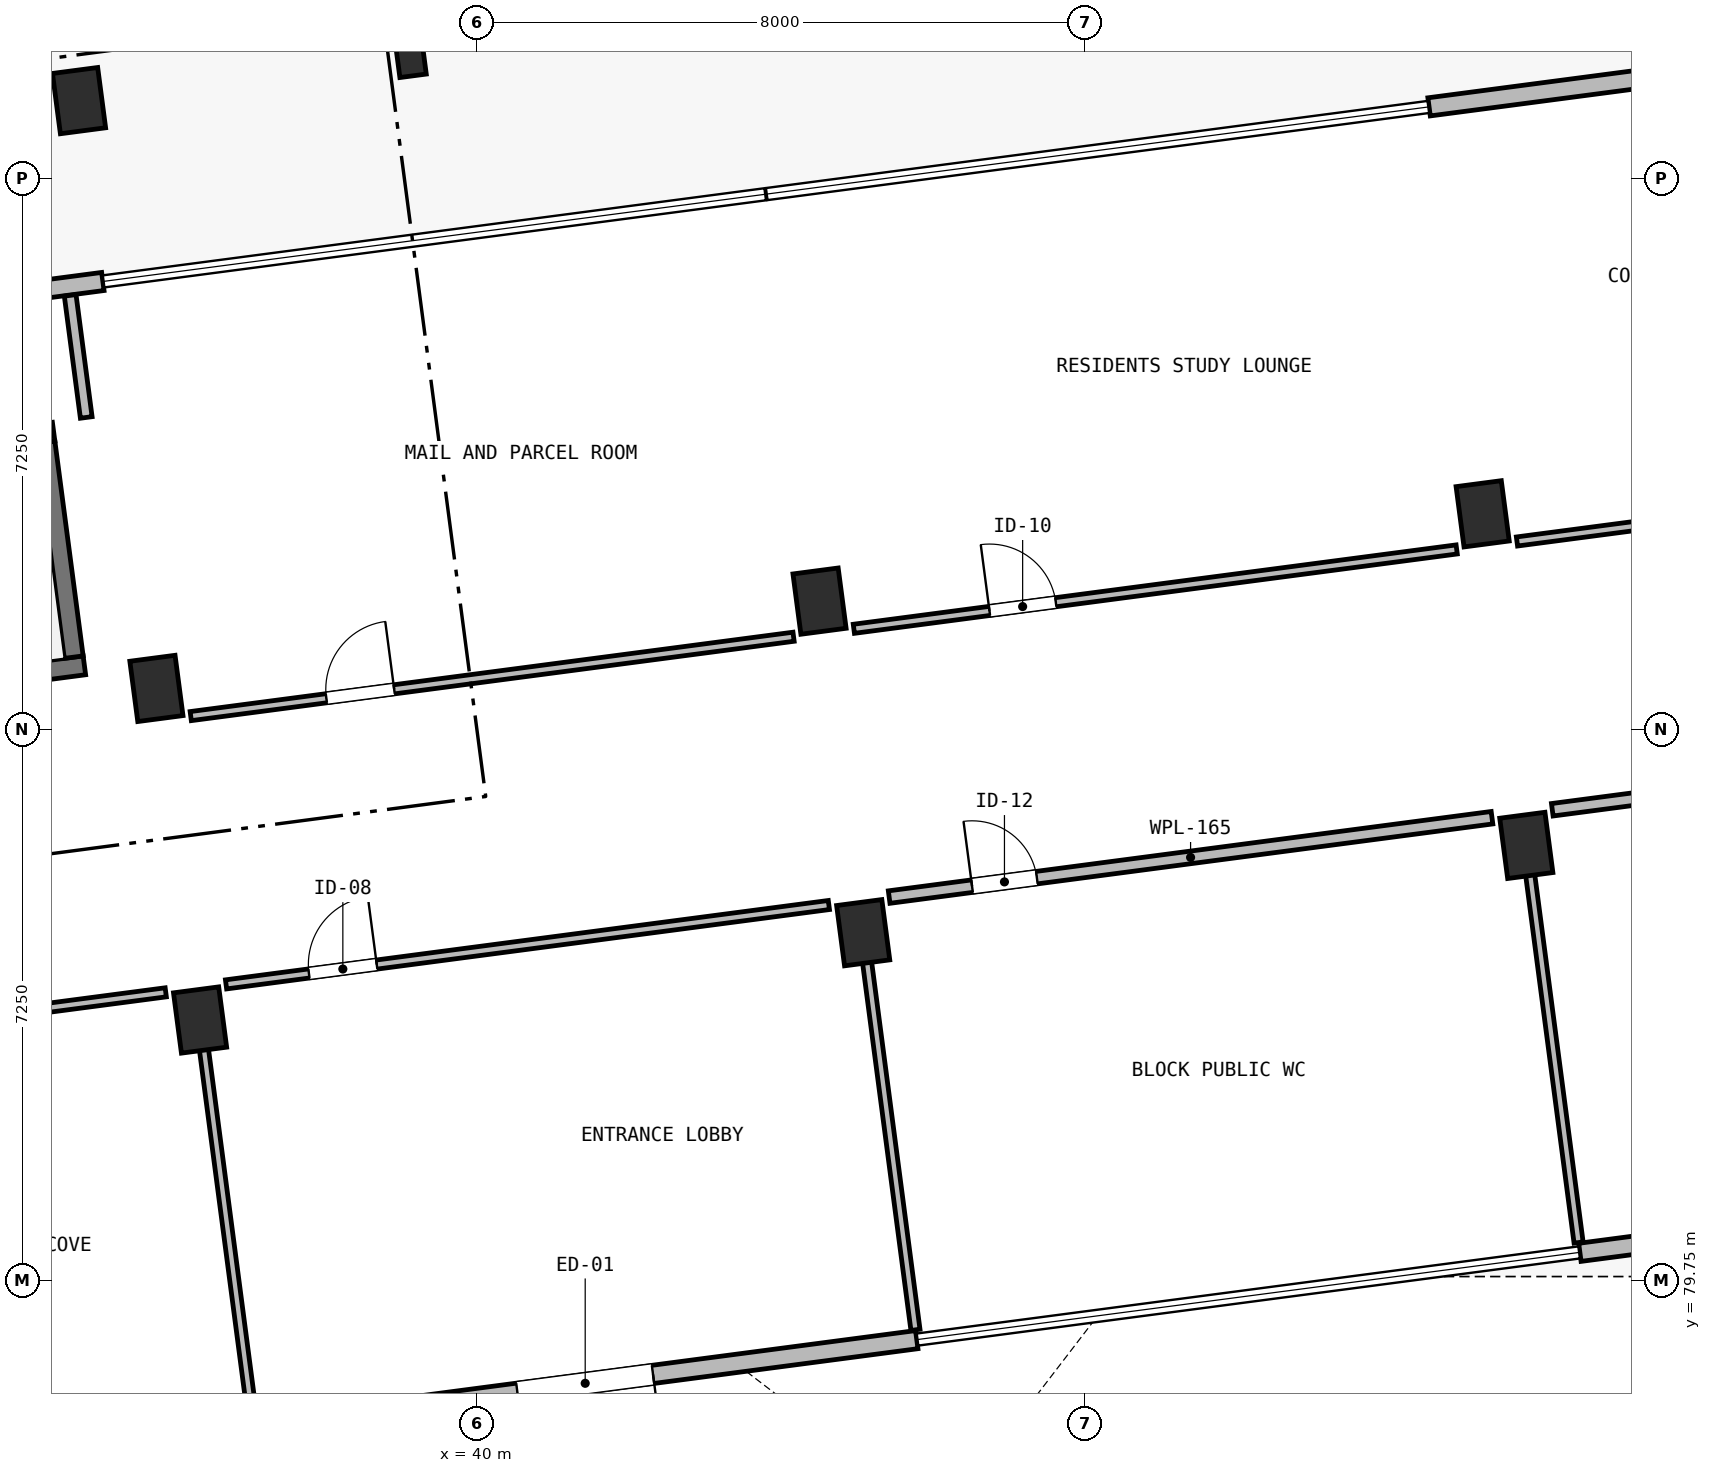
"""IFC4 building model, lengths in metres.
Left out: names, types, materials, properties, quantities, classifications, styles, units other than length and angle.
Written with IfcOpenShell. Run it as: python <this file> out.ifc"""

import sys

from ifc_helpers import new_model, si_unit, direction, frame, frame_2d, origin, origin_2d, place, context, subcontext, project, spatial, rectangle, extrude, element, fill, save


model = new_model("IFC4")
c1 = context("Model", 3, precision=1e-05, world=origin(), true_north=direction((0.0, 1.0)))
c2 = subcontext(c1, "Body", "Model", "MODEL_VIEW")
j1 = project(units=[si_unit("LENGTHUNIT", "METRE"), si_unit("PLANEANGLEUNIT", "RADIAN")], contexts=[c1])
p1 = place(None, origin())
s1 = spatial("IfcSite", under=j1, at=p1, CompositionType="ELEMENT")
p2 = place(p1, origin())
s2 = spatial("IfcBuilding", under=s1, at=p2, CompositionType="ELEMENT")
p3 = place(p2, origin())
s3 = spatial("IfcBuildingStorey", under=s2, at=p3, CompositionType="ELEMENT", Elevation=0.0)
for number, where, z_axis, x_axis in (
    (1, (36.356, 83.179, -0.35), (0.0, 0.0, 1.0), (0.991, 0.131, 0.0)),
    (2, (35.782, 87.542, -0.35), (0.0, 0.0, 1.0), (0.991, 0.131, 0.0)),
    (3, (34.764, 95.275, -0.35), (0.0, 0.0, 1.0), (0.991, 0.131, 0.0)),
    (4, (45.081, 84.328, -0.35), (0.0, 0.0, 1.0), (0.991, 0.131, 0.0)),
    (5, (44.506, 88.69, -0.35), (0.0, 0.0, 1.0), (0.991, 0.131, 0.0)),
    (6, (53.805, 85.476, -0.35), (0.0, 0.0, 1.0), (0.991, 0.131, 0.0)),
    (7, (53.231, 89.839, -0.35), (0.0, 0.0, 1.0), (0.991, 0.131, 0.0)),
):
    element("IfcColumn", number, at=place(p3, frame(where, z_axis=z_axis, x_axis=x_axis)), inside=s3, PredefinedType="COLUMN", context=c2, shape_type="SweptSolid", body=[
        extrude(rectangle(XDim=0.6, YDim=0.8, at=origin_2d()), origin(), (0.0, 0.0, 1.0), 4.85),
    ])
p4 = place(p3, frame((39.126, 95.849, -0.35), z_axis=(0.0, 0.0, 1.0), x_axis=(0.991444861374, 0.13052619222, 0.0)))
e8 = element("IfcColumn", 8, at=p4, inside=s3, PredefinedType="PILASTER", context=c2, shape_type="SweptSolid", body=[
    extrude(rectangle(XDim=0.35, YDim=0.5, at=origin_2d()), origin(), (0.0, 0.0, 1.0), 3.7),
])
p5 = place(p3, frame((27.489, 90.005, -0.35), z_axis=(0.0, 0.0, 1.0), x_axis=(0.991441944909, 0.130548343059, 0.0)))
e9 = element("IfcWall", 9, at=p5, inside=s3, PredefinedType="SHEAR", context=c2, shape_type="SweptSolid", body=[
    extrude(rectangle(XDim=7.0, YDim=0.25, at=frame_2d((3.5, 0.0))), origin(), (0.0, 0.0, 1.0), 4.85),
])
p6 = place(p5, frame((0.45, 0.0, 0.35)))
e10 = element("IfcOpeningElement", 10, at=p6, cuts=e9, PredefinedType="OPENING", context=c2, shape_type="SweptSolid", body=[
    extrude(rectangle(XDim=1.12, YDim=2.15, at=frame_2d((0.56, 1.075))), frame((0.0, 0.14, 0.0), z_axis=(0.0, -1.0, 0.0), x_axis=(1.0, 0.0, 0.0)), (0.0, 0.0, 1.0), 0.28),
])
p7 = place(p3, frame((27.894, 86.932, -0.35), z_axis=(0.0, 0.0, 1.0), x_axis=(0.991442539299, 0.130543828916, 0.0)))
e11 = element("IfcWall", 11, at=p7, inside=s3, PredefinedType="SHEAR", context=c2, shape_type="SweptSolid", body=[
    extrude(rectangle(XDim=7.0, YDim=0.25, at=frame_2d((3.5, 0.0))), origin(), (0.0, 0.0, 1.0), 4.85),
])
p8 = place(p7, frame((0.45, 0.0, 0.35)))
e12 = element("IfcOpeningElement", 12, at=p8, cuts=e11, PredefinedType="OPENING", context=c2, shape_type="SweptSolid", body=[
    extrude(rectangle(XDim=1.05, YDim=2.15, at=frame_2d((0.525, 1.075))), frame((0.0, 0.14, 0.0), z_axis=(0.0, -1.0, 0.0), x_axis=(1.0, 0.0, 0.0)), (0.0, 0.0, 1.0), 0.28),
])
p9 = place(p3, frame((34.694, 87.953, -0.35), z_axis=(0.0, 0.0, 1.0), x_axis=(-0.130474457355, 0.991451671025, 0.0)))
e13 = element("IfcWall", 13, at=p9, inside=s3, PredefinedType="SHEAR", context=c2, shape_type="SweptSolid", body=[
    extrude(rectangle(XDim=2.85, YDim=0.25, at=frame_2d((1.425, 0.0))), origin(), (0.0, 0.0, 1.0), 4.85),
])
p10 = place(p3, frame((45.786, 78.974, 0.0), z_axis=(0.0, 0.0, 1.0), x_axis=(-0.991447967712, -0.130502595073, 0.0)))
e14 = element("IfcWall", 14, at=p10, inside=s3, PredefinedType="SOLIDWALL", context=c2, shape_type="SweptSolid", body=[
    extrude(rectangle(XDim=8.8, YDim=0.24, at=frame_2d((4.4, 0.0))), origin(), (0.0, 0.0, 1.0), 3.35),
])
p11 = place(p10, frame((3.5, 0.0, 0.0)))
e15 = element("IfcOpeningElement", 15, at=p11, cuts=e14, PredefinedType="OPENING", context=c2, shape_type="SweptSolid", body=[
    extrude(rectangle(XDim=1.8, YDim=2.4, at=frame_2d((0.9, 1.2))), frame((0.0, 0.135, 0.0), z_axis=(0.0, -1.0, 0.0), x_axis=(1.0, 0.0, 0.0)), (0.0, 0.0, 1.0), 0.27),
])
p12 = place(p3, frame((63.235, 81.271, 0.0), z_axis=(0.0, 0.0, 1.0), x_axis=(-0.991444377792, -0.130529865336, 0.0)))
e16 = element("IfcWall", 16, at=p12, inside=s3, PredefinedType="SOLIDWALL", context=c2, shape_type="SweptSolid", body=[
    extrude(rectangle(XDim=8.8, YDim=0.24, at=frame_2d((4.4, 0.0))), origin(), (0.0, 0.0, 1.0), 3.35),
])
p13 = place(p12, frame((4.01, 0.0, 0.55)))
e17 = element("IfcOpeningElement", 17, at=p13, cuts=e16, PredefinedType="OPENING", context=c2, shape_type="SweptSolid", body=[
    extrude(rectangle(XDim=0.78, YDim=2.2, at=frame_2d((0.39, 1.1))), frame((0.0, 0.135, 0.0), z_axis=(0.0, -1.0, 0.0), x_axis=(1.0, 0.0, 0.0)), (0.0, 0.0, 1.0), 0.27),
])
p14 = place(p3, frame((26.352, 91.747, 0.0), z_axis=(0.0, 0.0, 1.0), x_axis=(0.991444377792, 0.130529865336, 0.0)))
e18 = element("IfcWall", 18, at=p14, inside=s3, PredefinedType="SOLIDWALL", context=c2, shape_type="SweptSolid", body=[
    extrude(rectangle(XDim=8.8, YDim=0.24, at=frame_2d((4.4, 0.0))), origin(), (0.0, 0.0, 1.0), 3.35),
])
p15 = place(p14, frame((3.85, 0.0, 0.0)))
e19 = element("IfcOpeningElement", 19, at=p15, cuts=e18, PredefinedType="OPENING", context=c2, shape_type="SweptSolid", body=[
    extrude(rectangle(XDim=1.1, YDim=2.15, at=frame_2d((0.55, 1.075))), frame((0.0, 0.135, 0.0), z_axis=(0.0, -1.0, 0.0), x_axis=(1.0, 0.0, 0.0)), (0.0, 0.0, 1.0), 0.27),
])
p16 = place(p3, frame((52.526, 95.193, 0.0), z_axis=(0.0, 0.0, 1.0), x_axis=(0.991443905089, 0.130533455715, 0.0)))
e20 = element("IfcWall", 20, at=p16, inside=s3, PredefinedType="SOLIDWALL", context=c2, shape_type="SweptSolid", body=[
    extrude(rectangle(XDim=8.8, YDim=0.24, at=frame_2d((4.4, 0.0))), origin(), (0.0, 0.0, 1.0), 3.35),
])
p17 = place(p3, frame((30.848, 82.878, 0.0), z_axis=(0.0, 0.0, 1.0), x_axis=(0.991441907417, 0.13054862779, 0.0)))
e21 = element("IfcWall", 21, at=p17, inside=s3, PredefinedType="PARTITIONING", context=c2, shape_type="SweptSolid", body=[
    extrude(rectangle(XDim=5.1, YDim=0.12, at=frame_2d((2.55, 0.0))), origin(), (0.0, 0.0, 1.0), 4.22),
])
p18 = place(p17, frame((1.1, 0.0, 0.0)))
e22 = element("IfcOpeningElement", 22, at=p18, cuts=e21, PredefinedType="OPENING", context=c2, shape_type="SweptSolid", body=[
    extrude(rectangle(XDim=0.88, YDim=2.1, at=frame_2d((0.44, 1.05))), frame((0.0, 0.075, 0.0), z_axis=(0.0, -1.0, 0.0), x_axis=(1.0, 0.0, 0.0)), (0.0, 0.0, 1.0), 0.15),
])
p19 = place(p3, frame((36.698, 83.648, 0.0), z_axis=(0.0, 0.0, 1.0), x_axis=(0.991445360318, 0.130522402305, 0.0)))
e23 = element("IfcWall", 23, at=p19, inside=s3, PredefinedType="PARTITIONING", context=c2, shape_type="SweptSolid", body=[
    extrude(rectangle(XDim=8.0, YDim=0.12, at=frame_2d((4.0, 0.0))), origin(), (0.0, 0.0, 1.0), 4.22),
])
p20 = place(p19, frame((1.1, 0.0, 0.0)))
e24 = element("IfcOpeningElement", 24, at=p20, cuts=e23, PredefinedType="OPENING", context=c2, shape_type="SweptSolid", body=[
    extrude(rectangle(XDim=0.9, YDim=2.1, at=frame_2d((0.45, 1.05))), frame((0.0, 0.075, 0.0), z_axis=(0.0, -1.0, 0.0), x_axis=(1.0, 0.0, 0.0)), (0.0, 0.0, 1.0), 0.15),
])
p21 = place(p3, frame((37.044, 77.954, 0.0), z_axis=(0.0, 0.0, 1.0), x_axis=(-0.130522269222, 0.991445377838, 0.0)))
e25 = element("IfcWall", 25, at=p21, inside=s3, PredefinedType="PARTITIONING", context=c2, shape_type="SweptSolid", body=[
    extrude(rectangle(XDim=4.94, YDim=0.12, at=frame_2d((2.47, 0.0))), origin(), (0.0, 0.0, 1.0), 3.32),
])
p22 = place(p3, frame((45.423, 84.796, 0.0), z_axis=(0.0, 0.0, 1.0), x_axis=(0.991444840399, 0.130526351537, 0.0)))
e26 = element("IfcWall", 26, at=p22, inside=s3, PredefinedType="PLUMBINGWALL", context=c2, shape_type="SweptSolid", body=[
    extrude(rectangle(XDim=8.0, YDim=0.165, at=frame_2d((4.0, 0.0))), origin(), (0.0, 0.0, 1.0), 4.22),
])
p23 = place(p22, frame((1.1, 0.0, 0.0)))
e27 = element("IfcOpeningElement", 27, at=p23, cuts=e26, PredefinedType="OPENING", context=c2, shape_type="SweptSolid", body=[
    extrude(rectangle(XDim=0.86, YDim=2.1, at=frame_2d((0.43, 1.05))), frame((0.0, 0.097, 0.0), z_axis=(0.0, -1.0, 0.0), x_axis=(1.0, 0.0, 0.0)), (0.0, 0.0, 1.0), 0.195),
])
p24 = place(p3, frame((45.769, 79.103, 0.0), z_axis=(0.0, 0.0, 1.0), x_axis=(-0.130515874105, 0.991446219725, 0.0)))
e28 = element("IfcWall", 28, at=p24, inside=s3, PredefinedType="PARTITIONING", context=c2, shape_type="SweptSolid", body=[
    extrude(rectangle(XDim=4.94, YDim=0.12, at=frame_2d((2.47, 0.0))), origin(), (0.0, 0.0, 1.0), 3.32),
])
p25 = place(p3, frame((54.147, 85.945, 0.0), z_axis=(0.0, 0.0, 1.0), x_axis=(0.991445360318, 0.130522402305, 0.0)))
e29 = element("IfcWall", 29, at=p25, inside=s3, PredefinedType="PLUMBINGWALL", context=c2, shape_type="SweptSolid", body=[
    extrude(rectangle(XDim=8.0, YDim=0.165, at=frame_2d((4.0, 0.0))), origin(), (0.0, 0.0, 1.0), 4.22),
])
p26 = place(p25, frame((1.1, 0.0, 0.0)))
e30 = element("IfcOpeningElement", 30, at=p26, cuts=e29, PredefinedType="OPENING", context=c2, shape_type="SweptSolid", body=[
    extrude(rectangle(XDim=0.96, YDim=2.12, at=frame_2d((0.48, 1.06))), frame((0.0, 0.097, 0.0), z_axis=(0.0, -1.0, 0.0), x_axis=(1.0, 0.0, 0.0)), (0.0, 0.0, 1.0), 0.195),
])
p27 = place(p3, frame((54.493, 80.251, 0.0), z_axis=(0.0, 0.0, 1.0), x_axis=(-0.130522269222, 0.991445377838, 0.0)))
e31 = element("IfcWall", 31, at=p27, inside=s3, PredefinedType="PARTITIONING", context=c2, shape_type="SweptSolid", body=[
    extrude(rectangle(XDim=4.94, YDim=0.12, at=frame_2d((2.47, 0.0))), origin(), (0.0, 0.0, 1.0), 3.32),
])
p28 = place(p3, frame((36.233, 87.177, 0.0), z_axis=(0.0, 0.0, 1.0), x_axis=(0.991445360318, 0.130522402305, 0.0)))
e32 = element("IfcWall", 32, at=p28, inside=s3, PredefinedType="PARTITIONING", context=c2, shape_type="SweptSolid", body=[
    extrude(rectangle(XDim=8.0, YDim=0.12, at=frame_2d((4.0, 0.0))), origin(), (0.0, 0.0, 1.0), 4.22),
])
p29 = place(p28, frame((1.8, 0.0, 0.0)))
e33 = element("IfcOpeningElement", 33, at=p29, cuts=e32, PredefinedType="OPENING", context=c2, shape_type="SweptSolid", body=[
    extrude(rectangle(XDim=0.9, YDim=2.1, at=frame_2d((0.45, 1.05))), frame((0.0, 0.075, 0.0), z_axis=(0.0, -1.0, 0.0), x_axis=(1.0, 0.0, 0.0)), (0.0, 0.0, 1.0), 0.15),
])
p30 = place(p3, frame((44.958, 88.326, 0.0), z_axis=(0.0, 0.0, 1.0), x_axis=(0.991445360318, 0.130522402305, 0.0)))
e34 = element("IfcWall", 34, at=p30, inside=s3, PredefinedType="PARTITIONING", context=c2, shape_type="SweptSolid", body=[
    extrude(rectangle(XDim=8.0, YDim=0.12, at=frame_2d((4.0, 0.0))), origin(), (0.0, 0.0, 1.0), 4.22),
])
p31 = place(p30, frame((1.8, 0.0, 0.0)))
e35 = element("IfcOpeningElement", 35, at=p31, cuts=e34, PredefinedType="OPENING", context=c2, shape_type="SweptSolid", body=[
    extrude(rectangle(XDim=0.88, YDim=2.1, at=frame_2d((0.44, 1.05))), frame((0.0, 0.075, 0.0), z_axis=(0.0, -1.0, 0.0), x_axis=(1.0, 0.0, 0.0)), (0.0, 0.0, 1.0), 0.15),
])
p32 = place(p3, frame((53.683, 89.475, 0.0), z_axis=(0.0, 0.0, 1.0), x_axis=(0.991444840399, 0.130526351537, 0.0)))
e36 = element("IfcWall", 36, at=p32, inside=s3, PredefinedType="PARTITIONING", context=c2, shape_type="SweptSolid", body=[
    extrude(rectangle(XDim=8.0, YDim=0.12, at=frame_2d((4.0, 0.0))), origin(), (0.0, 0.0, 1.0), 4.22),
])
p33 = place(p32, frame((1.8, 0.0, 0.0)))
e37 = element("IfcOpeningElement", 37, at=p33, cuts=e36, PredefinedType="OPENING", context=c2, shape_type="SweptSolid", body=[
    extrude(rectangle(XDim=0.9, YDim=2.1, at=frame_2d((0.45, 1.05))), frame((0.0, 0.075, 0.0), z_axis=(0.0, -1.0, 0.0), x_axis=(1.0, 0.0, 0.0)), (0.0, 0.0, 1.0), 0.15),
])
p34 = place(p3, frame((34.858, 91.106, 0.0), z_axis=(0.0, 0.0, 1.0), x_axis=(-0.130505189885, 0.991447626157, 0.0)))
e38 = element("IfcWall", 38, at=p34, inside=s3, PredefinedType="PARTITIONING", context=c2, shape_type="SweptSolid", body=[
    extrude(rectangle(XDim=1.62, YDim=0.155, at=frame_2d((0.81, 0.0))), origin(), (0.0, 0.0, 1.0), 3.35),
])
p35 = place(p11, origin())
e39 = element("IfcDoor", 39, at=p35, inside=s3, OperationType="DOUBLE_DOOR_SINGLE_SWING", PredefinedType="DOOR", context=c2, shape_type="SweptSolid", body=[
    extrude(rectangle(XDim=1.8, YDim=2.4, at=frame_2d((0.9, 1.2))), frame((0.0, 0.025, 0.0), z_axis=(0.0, -1.0, 0.0), x_axis=(1.0, 0.0, 0.0)), (0.0, 0.0, 1.0), 0.05),
])
fill(e15, e39)
p36 = place(p20, origin())
e40 = element("IfcDoor", 40, at=p36, inside=s3, OperationType="SINGLE_SWING_RIGHT", PredefinedType="DOOR", context=c2, shape_type="SweptSolid", body=[
    extrude(rectangle(XDim=0.9, YDim=2.1, at=frame_2d((0.45, 1.05))), frame((0.0, 0.025, 0.0), z_axis=(0.0, -1.0, 0.0), x_axis=(1.0, 0.0, 0.0)), (0.0, 0.0, 1.0), 0.05),
])
fill(e24, e40)
p37 = place(p23, origin())
e41 = element("IfcDoor", 41, at=p37, inside=s3, OperationType="SINGLE_SWING_LEFT", PredefinedType="DOOR", context=c2, shape_type="SweptSolid", body=[
    extrude(rectangle(XDim=0.86, YDim=2.1, at=frame_2d((0.43, 1.05))), frame((0.0, 0.025, 0.0), z_axis=(0.0, -1.0, 0.0), x_axis=(1.0, 0.0, 0.0)), (0.0, 0.0, 1.0), 0.05),
])
fill(e27, e41)
p38 = place(p29, origin())
e42 = element("IfcDoor", 42, at=p38, inside=s3, OperationType="SINGLE_SWING_RIGHT", PredefinedType="DOOR", context=c2, shape_type="SweptSolid", body=[
    extrude(rectangle(XDim=0.9, YDim=2.1, at=frame_2d((0.45, 1.05))), frame((0.0, 0.025, 0.0), z_axis=(0.0, -1.0, 0.0), x_axis=(1.0, 0.0, 0.0)), (0.0, 0.0, 1.0), 0.05),
])
fill(e33, e42)
p39 = place(p31, origin())
e43 = element("IfcDoor", 43, at=p39, inside=s3, OperationType="SINGLE_SWING_LEFT", PredefinedType="DOOR", context=c2, shape_type="SweptSolid", body=[
    extrude(rectangle(XDim=0.88, YDim=2.1, at=frame_2d((0.44, 1.05))), frame((0.0, 0.025, 0.0), z_axis=(0.0, -1.0, 0.0), x_axis=(1.0, 0.0, 0.0)), (0.0, 0.0, 1.0), 0.05),
])
fill(e35, e43)
save(model, sys.argv[1])
